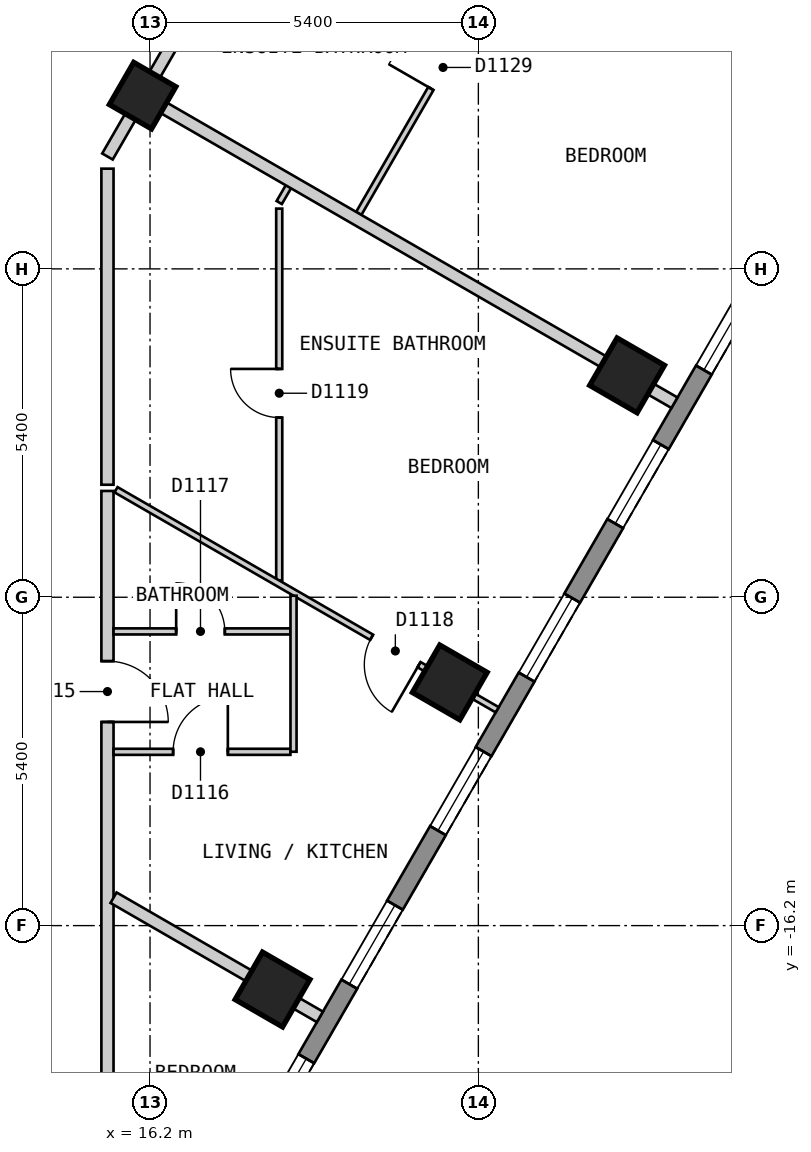
"""IFC4 building model, lengths in metres.
Left out: names, types, materials, properties, quantities, classifications, styles, units other than length and angle.
Written with IfcOpenShell. Run it as: python <this file> out.ifc"""

import sys

from ifc_helpers import new_model, si_unit, direction, frame, frame_2d, origin, origin_2d, place, context, subcontext, project, spatial, polyline, rectangle, outline, extrude, element, fill, save


model = new_model("IFC4")
c1 = context("Model", 3, precision=1e-05, world=origin(), true_north=direction((0.0, 1.0)))
c2 = subcontext(c1, "Body", "Model", "MODEL_VIEW")
j1 = project(units=[si_unit("LENGTHUNIT", "METRE"), si_unit("PLANEANGLEUNIT", "RADIAN")], contexts=[c1])
p1 = place(None, origin())
s1 = spatial("IfcSite", under=j1, at=p1, CompositionType="ELEMENT")
p2 = place(p1, origin())
s2 = spatial("IfcBuilding", under=s1, at=p2, CompositionType="ELEMENT")
p3 = place(p2, frame((0.0, 0.0, 150.6)))
s3 = spatial("IfcBuildingStorey", under=s2, at=p3, CompositionType="ELEMENT", Elevation=150.6)
for number, where, z_axis, x_axis in (
    (1, (18.215, -17.251, 0.0), (0.0, 0.0, 1.0), (0.5, 0.866, 0.0)),
    (2, (21.13, -12.201, 0.0), (0.0, 0.0, 1.0), (0.5, 0.866, 0.0)),
    (3, (24.046, -7.151, 0.0), (0.0, 0.0, 1.0), (0.5, 0.866, 0.0)),
):
    element("IfcColumn", number, at=place(p3, frame(where, z_axis=z_axis, x_axis=x_axis)), inside=s3, PredefinedType="COLUMN", context=c2, shape_type="SweptSolid", body=[
        extrude(rectangle(XDim=0.9, YDim=0.9, at=origin_2d()), origin(), (0.0, 0.0, 1.0), 3.0),
    ])
p4 = place(p3, frame((16.078, -2.551, 0.0), z_axis=(0.0, 0.0, 1.0), x_axis=(0.5, 0.866025403784, 0.0)))
e4 = element("IfcColumn", 4, at=p4, inside=s3, PredefinedType="COLUMN", context=c2, shape_type="SweptSolid", body=[
    extrude(rectangle(XDim=0.8, YDim=0.8, at=origin_2d()), origin(), (0.0, 0.0, 1.0), 3.0),
])
p5 = place(p3, frame((15.862, -23.425, 0.0), z_axis=(0.0, 0.0, 1.0), x_axis=(0.500017503135, 0.866015298109, 0.0)))
e5 = element("IfcWall", 5, at=p5, inside=s3, PredefinedType="SOLIDWALL", context=c2, shape_type="SweptSolid", body=[
    extrude(outline(polyline([(0.0, -0.15), (24.711, -0.15), (24.631, 0.15), (0.08, 0.15), (0.0, -0.15)])), origin(), (0.0, 0.0, 1.0), 2.6),
])
p6 = place(p5, frame((1.4, 0.0, 0.15)))
e6 = element("IfcOpeningElement", 6, at=p6, cuts=e5, PredefinedType="OPENING", context=c2, shape_type="SweptSolid", body=[
    extrude(rectangle(XDim=1.5, YDim=2.1, at=frame_2d((0.75, 1.05))), frame((0.0, 0.16, 0.0), z_axis=(0.0, -1.0, 0.0), x_axis=(1.0, 0.0, 0.0)), (0.0, 0.0, 1.0), 0.32),
])
p7 = place(p5, frame((4.316, 0.0, 0.15)))
e7 = element("IfcOpeningElement", 7, at=p7, cuts=e5, PredefinedType="OPENING", context=c2, shape_type="SweptSolid", body=[
    extrude(rectangle(XDim=1.5, YDim=2.1, at=frame_2d((0.75, 1.05))), frame((0.0, 0.16, 0.0), z_axis=(0.0, -1.0, 0.0), x_axis=(1.0, 0.0, 0.0)), (0.0, 0.0, 1.0), 0.32),
])
p8 = place(p5, frame((7.231, 0.0, 0.15)))
e8 = element("IfcOpeningElement", 8, at=p8, cuts=e5, PredefinedType="OPENING", context=c2, shape_type="SweptSolid", body=[
    extrude(rectangle(XDim=1.5, YDim=2.1, at=frame_2d((0.75, 1.05))), frame((0.0, 0.16, 0.0), z_axis=(0.0, -1.0, 0.0), x_axis=(1.0, 0.0, 0.0)), (0.0, 0.0, 1.0), 0.32),
])
p9 = place(p5, frame((10.147, 0.0, 0.15)))
e9 = element("IfcOpeningElement", 9, at=p9, cuts=e5, PredefinedType="OPENING", context=c2, shape_type="SweptSolid", body=[
    extrude(rectangle(XDim=1.5, YDim=2.1, at=frame_2d((0.75, 1.05))), frame((0.0, 0.16, 0.0), z_axis=(0.0, -1.0, 0.0), x_axis=(1.0, 0.0, 0.0)), (0.0, 0.0, 1.0), 0.32),
])
p10 = place(p5, frame((13.062, 0.0, 0.15)))
e10 = element("IfcOpeningElement", 10, at=p10, cuts=e5, PredefinedType="OPENING", context=c2, shape_type="SweptSolid", body=[
    extrude(rectangle(XDim=1.5, YDim=2.1, at=frame_2d((0.75, 1.05))), frame((0.0, 0.16, 0.0), z_axis=(0.0, -1.0, 0.0), x_axis=(1.0, 0.0, 0.0)), (0.0, 0.0, 1.0), 0.32),
])
p11 = place(p5, frame((15.977, 0.0, 0.15)))
e11 = element("IfcOpeningElement", 11, at=p11, cuts=e5, PredefinedType="OPENING", context=c2, shape_type="SweptSolid", body=[
    extrude(rectangle(XDim=1.5, YDim=2.1, at=frame_2d((0.75, 1.05))), frame((0.0, 0.16, 0.0), z_axis=(0.0, -1.0, 0.0), x_axis=(1.0, 0.0, 0.0)), (0.0, 0.0, 1.0), 0.32),
])
p12 = place(p5, frame((18.893, 0.0, 0.15)))
e12 = element("IfcOpeningElement", 12, at=p12, cuts=e5, PredefinedType="OPENING", context=c2, shape_type="SweptSolid", body=[
    extrude(rectangle(XDim=1.5, YDim=2.1, at=frame_2d((0.75, 1.05))), frame((0.0, 0.16, 0.0), z_axis=(0.0, -1.0, 0.0), x_axis=(1.0, 0.0, 0.0)), (0.0, 0.0, 1.0), 0.32),
])
p13 = place(p5, frame((21.809, 0.0, 0.15)))
e13 = element("IfcOpeningElement", 13, at=p13, cuts=e5, PredefinedType="OPENING", context=c2, shape_type="SweptSolid", body=[
    extrude(rectangle(XDim=1.5, YDim=2.1, at=frame_2d((0.75, 1.05))), frame((0.0, 0.16, 0.0), z_axis=(0.0, -1.0, 0.0), x_axis=(1.0, 0.0, 0.0)), (0.0, 0.0, 1.0), 0.32),
])
p14 = place(p3, frame((15.5, -3.752, 0.0), z_axis=(0.0, 0.0, 1.0), x_axis=(0.0, -1.0, 0.0)))
e14 = element("IfcWall", 14, at=p14, inside=s3, PredefinedType="PARTITIONING", context=c2, shape_type="SweptSolid", body=[
    extrude(rectangle(XDim=5.198, YDim=0.2, at=frame_2d((2.599, 0.0))), origin(), (0.0, 0.0, 1.0), 2.6),
])
p15 = place(p3, frame((13.394, -2.8, 0.0), z_axis=(0.0, 0.0, 1.0), x_axis=(0.499968324138, 0.866043691079, 0.0)))
e15 = element("IfcWall", 15, at=p15, inside=s3, PredefinedType="PARTITIONING", context=c2, shape_type="SweptSolid", body=[
    extrude(rectangle(XDim=3.696, YDim=0.2, at=frame_2d((1.848, 0.0))), origin(), (0.0, 0.0, 1.0), 2.6),
])
p16 = place(p3, frame((15.5, -3.552, 0.0), z_axis=(0.0, 0.0, 1.0), x_axis=(0.499914724673, 0.86607463192, 0.0)))
e16 = element("IfcWall", 16, at=p16, inside=s3, PredefinedType="PARTITIONING", context=c2, shape_type="SweptSolid", body=[
    extrude(rectangle(XDim=4.507, YDim=0.2, at=frame_2d((2.253, 0.0))), origin(), (0.0, 0.0, 1.0), 2.6),
])
p17 = place(p3, frame((15.5, -21.199, 0.0), z_axis=(0.0, 0.0, 1.0), x_axis=(0.0, 1.0, 0.0)))
e17 = element("IfcWall", 17, at=p17, inside=s3, PredefinedType="PARTITIONING", context=c2, shape_type="SweptSolid", body=[
    extrude(rectangle(XDim=12.147, YDim=0.2, at=frame_2d((6.073, 0.0))), origin(), (0.0, 0.0, 1.0), 2.6),
])
p18 = place(p17, frame((8.348, 0.0, 0.0)))
e18 = element("IfcOpeningElement", 18, at=p18, cuts=e17, PredefinedType="OPENING", context=c2, shape_type="SweptSolid", body=[
    extrude(rectangle(XDim=1.0, YDim=2.1, at=frame_2d((0.5, 1.05))), frame((0.0, 0.11, 0.0), z_axis=(0.0, -1.0, 0.0), x_axis=(1.0, 0.0, 0.0)), (0.0, 0.0, 1.0), 0.22),
])
p19 = place(p3, frame((18.325, -4.409, 0.0), z_axis=(0.0, 0.0, 1.0), x_axis=(0.0, -1.0, 0.0)))
e19 = element("IfcWall", 19, at=p19, inside=s3, PredefinedType="PARTITIONING", context=c2, shape_type="SweptSolid", body=[
    extrude(rectangle(XDim=6.115, YDim=0.1, at=frame_2d((3.058, 0.0))), origin(), (0.0, 0.0, 1.0), 2.6),
])
p20 = place(p19, frame((2.636, 0.0, 0.0)))
e20 = element("IfcOpeningElement", 20, at=p20, cuts=e19, PredefinedType="OPENING", context=c2, shape_type="SweptSolid", body=[
    extrude(rectangle(XDim=0.8, YDim=2.1, at=frame_2d((0.4, 1.05))), frame((0.0, 0.06, 0.0), z_axis=(0.0, -1.0, 0.0), x_axis=(1.0, 0.0, 0.0)), (0.0, 0.0, 1.0), 0.12),
])
p21 = place(p3, frame((15.641, -9.032, 0.0), z_axis=(0.0, 0.0, 1.0), x_axis=(0.866049104564, -0.499958946799, 0.0)))
e21 = element("IfcWall", 21, at=p21, inside=s3, PredefinedType="PARTITIONING", context=c2, shape_type="SweptSolid", body=[
    extrude(rectangle(XDim=7.238, YDim=0.1, at=frame_2d((3.619, 0.0))), origin(), (0.0, 0.0, 1.0), 2.6),
])
p22 = place(p21, frame((4.854, 0.0, 0.0)))
e22 = element("IfcOpeningElement", 22, at=p22, cuts=e21, PredefinedType="OPENING", context=c2, shape_type="SweptSolid", body=[
    extrude(rectangle(XDim=0.9, YDim=2.1, at=frame_2d((0.45, 1.05))), frame((0.0, 0.06, 0.0), z_axis=(0.0, -1.0, 0.0), x_axis=(1.0, 0.0, 0.0)), (0.0, 0.0, 1.0), 0.12),
])
p23 = place(p3, frame((22.679, 0.372, 0.0), z_axis=(0.0, 0.0, 1.0), x_axis=(0.865985260119, -0.500069524424, 0.0)))
e23 = element("IfcWall", 23, at=p23, inside=s3, PredefinedType="PARTITIONING", context=c2, shape_type="SweptSolid", body=[
    extrude(rectangle(XDim=5.845, YDim=0.1, at=frame_2d((2.923, 0.0))), origin(), (0.0, 0.0, 1.0), 2.6),
])
p24 = place(p23, frame((2.444, 0.0, 0.0)))
e24 = element("IfcOpeningElement", 24, at=p24, cuts=e23, PredefinedType="OPENING", context=c2, shape_type="SweptSolid", body=[
    extrude(rectangle(XDim=0.9, YDim=2.1, at=frame_2d((0.45, 1.05))), frame((0.0, 0.06, 0.0), z_axis=(0.0, -1.0, 0.0), x_axis=(1.0, 0.0, 0.0)), (0.0, 0.0, 1.0), 0.12),
])
p25 = place(p3, frame((15.6, -11.362, 0.0), z_axis=(0.0, 0.0, 1.0), x_axis=(1.0, 0.0, 0.0)))
e25 = element("IfcWall", 25, at=p25, inside=s3, PredefinedType="PARTITIONING", context=c2, shape_type="SweptSolid", body=[
    extrude(rectangle(XDim=2.91, YDim=0.1, at=frame_2d((1.455, 0.0))), origin(), (0.0, 0.0, 1.0), 2.6),
])
p26 = place(p25, frame((1.03, 0.0, 0.0)))
e26 = element("IfcOpeningElement", 26, at=p26, cuts=e25, PredefinedType="OPENING", context=c2, shape_type="SweptSolid", body=[
    extrude(rectangle(XDim=0.8, YDim=2.1, at=frame_2d((0.4, 1.05))), frame((0.0, 0.06, 0.0), z_axis=(0.0, -1.0, 0.0), x_axis=(1.0, 0.0, 0.0)), (0.0, 0.0, 1.0), 0.12),
])
p27 = place(p3, frame((15.6, -13.342, 0.0), z_axis=(0.0, 0.0, 1.0), x_axis=(1.0, 0.0, 0.0)))
e27 = element("IfcWall", 27, at=p27, inside=s3, PredefinedType="PARTITIONING", context=c2, shape_type="SweptSolid", body=[
    extrude(rectangle(XDim=2.909, YDim=0.1, at=frame_2d((1.455, 0.0))), origin(), (0.0, 0.0, 1.0), 2.6),
])
p28 = place(p27, frame((0.98, 0.0, 0.0)))
e28 = element("IfcOpeningElement", 28, at=p28, cuts=e27, PredefinedType="OPENING", context=c2, shape_type="SweptSolid", body=[
    extrude(rectangle(XDim=0.9, YDim=2.1, at=frame_2d((0.45, 1.05))), frame((0.0, 0.06, 0.0), z_axis=(0.0, -1.0, 0.0), x_axis=(1.0, 0.0, 0.0)), (0.0, 0.0, 1.0), 0.12),
])
p29 = place(p3, frame((18.325, -4.309, 0.0), z_axis=(0.0, 0.0, 1.0), x_axis=(0.5014706583, 0.865174652232, 0.0)))
e29 = element("IfcWall", 29, at=p29, inside=s3, PredefinedType="PARTITIONING", context=c2, shape_type="SweptSolid", body=[
    extrude(rectangle(XDim=0.399, YDim=0.1, at=frame_2d((0.199, 0.0))), origin(), (0.0, 0.0, 1.0), 2.6),
])
p30 = place(p3, frame((19.633, -4.488, 0.0), z_axis=(0.0, 0.0, 1.0), x_axis=(0.500050624552, 0.865996173713, 0.0)))
e30 = element("IfcWall", 30, at=p30, inside=s3, PredefinedType="PARTITIONING", context=c2, shape_type="SweptSolid", body=[
    extrude(rectangle(XDim=5.646, YDim=0.1, at=frame_2d((2.823, 0.0))), origin(), (0.0, 0.0, 1.0), 2.6),
])
p31 = place(p30, frame((2.372, 0.0, 0.0)))
e31 = element("IfcOpeningElement", 31, at=p31, cuts=e30, PredefinedType="OPENING", context=c2, shape_type="SweptSolid", body=[
    extrude(rectangle(XDim=0.8, YDim=2.1, at=frame_2d((0.4, 1.05))), frame((0.0, 0.06, 0.0), z_axis=(0.0, -1.0, 0.0), x_axis=(1.0, 0.0, 0.0)), (0.0, 0.0, 1.0), 0.12),
])
p32 = place(p3, frame((18.56, -13.341, 0.0), z_axis=(0.0, 0.0, 1.0), x_axis=(0.0, 1.0, 0.0)))
e32 = element("IfcWall", 32, at=p32, inside=s3, PredefinedType="PARTITIONING", context=c2, shape_type="SweptSolid", body=[
    extrude(rectangle(XDim=2.566, YDim=0.1, at=frame_2d((1.283, 0.0))), origin(), (0.0, 0.0, 1.0), 2.6),
])
p33 = place(p3, frame((15.6, -15.741, 0.0), z_axis=(0.0, 0.0, 1.0), x_axis=(0.865964599155, -0.500105301922, 0.0)))
e33 = element("IfcWall", 33, at=p33, inside=s3, PredefinedType="PARTITIONING", context=c2, shape_type="SweptSolid", body=[
    extrude(rectangle(XDim=3.919, YDim=0.2, at=frame_2d((1.959, 0.0))), origin(), (0.0, 0.0, 1.0), 2.6),
])
p34 = place(p3, frame((16.165, -2.601, 0.0), z_axis=(0.0, 0.0, 1.0), x_axis=(0.866016855193, -0.500014806302, 0.0)))
e34 = element("IfcWall", 34, at=p34, inside=s3, PredefinedType="PARTITIONING", context=c2, shape_type="SweptSolid", body=[
    extrude(rectangle(XDim=10.0, YDim=0.2, at=frame_2d((5.0, 0.0))), origin(), (0.0, 0.0, 1.0), 2.6),
])
p35 = place(p7, origin())
e35 = element("IfcWindow", 35, at=p35, inside=s3, PartitioningType="SINGLE_PANEL", PredefinedType="WINDOW", context=c2, shape_type="SweptSolid", body=[
    extrude(rectangle(XDim=1.5, YDim=2.1, at=frame_2d((0.75, 1.05))), frame((0.0, 0.03, 0.0), z_axis=(0.0, -1.0, 0.0), x_axis=(1.0, 0.0, 0.0)), (0.0, 0.0, 1.0), 0.06),
])
fill(e7, e35)
p36 = place(p8, origin())
e36 = element("IfcWindow", 36, at=p36, inside=s3, PartitioningType="SINGLE_PANEL", PredefinedType="WINDOW", context=c2, shape_type="SweptSolid", body=[
    extrude(rectangle(XDim=1.5, YDim=2.1, at=frame_2d((0.75, 1.05))), frame((0.0, 0.03, 0.0), z_axis=(0.0, -1.0, 0.0), x_axis=(1.0, 0.0, 0.0)), (0.0, 0.0, 1.0), 0.06),
])
fill(e8, e36)
p37 = place(p9, origin())
e37 = element("IfcWindow", 37, at=p37, inside=s3, PartitioningType="SINGLE_PANEL", PredefinedType="WINDOW", context=c2, shape_type="SweptSolid", body=[
    extrude(rectangle(XDim=1.5, YDim=2.1, at=frame_2d((0.75, 1.05))), frame((0.0, 0.03, 0.0), z_axis=(0.0, -1.0, 0.0), x_axis=(1.0, 0.0, 0.0)), (0.0, 0.0, 1.0), 0.06),
])
fill(e9, e37)
p38 = place(p10, origin())
e38 = element("IfcWindow", 38, at=p38, inside=s3, PartitioningType="SINGLE_PANEL", PredefinedType="WINDOW", context=c2, shape_type="SweptSolid", body=[
    extrude(rectangle(XDim=1.5, YDim=2.1, at=frame_2d((0.75, 1.05))), frame((0.0, 0.03, 0.0), z_axis=(0.0, -1.0, 0.0), x_axis=(1.0, 0.0, 0.0)), (0.0, 0.0, 1.0), 0.06),
])
fill(e10, e38)
p39 = place(p11, origin())
e39 = element("IfcWindow", 39, at=p39, inside=s3, PartitioningType="SINGLE_PANEL", PredefinedType="WINDOW", context=c2, shape_type="SweptSolid", body=[
    extrude(rectangle(XDim=1.5, YDim=2.1, at=frame_2d((0.75, 1.05))), frame((0.0, 0.03, 0.0), z_axis=(0.0, -1.0, 0.0), x_axis=(1.0, 0.0, 0.0)), (0.0, 0.0, 1.0), 0.06),
])
fill(e11, e39)
p40 = place(p12, origin())
e40 = element("IfcWindow", 40, at=p40, inside=s3, PartitioningType="SINGLE_PANEL", PredefinedType="WINDOW", context=c2, shape_type="SweptSolid", body=[
    extrude(rectangle(XDim=1.5, YDim=2.1, at=frame_2d((0.75, 1.05))), frame((0.0, 0.03, 0.0), z_axis=(0.0, -1.0, 0.0), x_axis=(1.0, 0.0, 0.0)), (0.0, 0.0, 1.0), 0.06),
])
fill(e12, e40)
p41 = place(p18, origin())
e41 = element("IfcDoor", 41, at=p41, inside=s3, OperationType="SINGLE_SWING_LEFT", PredefinedType="DOOR", context=c2, shape_type="SweptSolid", body=[
    extrude(rectangle(XDim=1.0, YDim=2.1, at=frame_2d((0.5, 1.05))), frame((0.0, 0.025, 0.0), z_axis=(0.0, -1.0, 0.0), x_axis=(1.0, 0.0, 0.0)), (0.0, 0.0, 1.0), 0.05),
])
fill(e18, e41)
p42 = place(p28, origin())
e42 = element("IfcDoor", 42, at=p42, inside=s3, OperationType="SINGLE_SWING_RIGHT", PredefinedType="DOOR", context=c2, shape_type="SweptSolid", body=[
    extrude(rectangle(XDim=0.9, YDim=2.1, at=frame_2d((0.45, 1.05))), frame((0.0, 0.025, 0.0), z_axis=(0.0, -1.0, 0.0), x_axis=(1.0, 0.0, 0.0)), (0.0, 0.0, 1.0), 0.05),
])
fill(e28, e42)
p43 = place(p26, origin())
e43 = element("IfcDoor", 43, at=p43, inside=s3, OperationType="SINGLE_SWING_LEFT", PredefinedType="DOOR", context=c2, shape_type="SweptSolid", body=[
    extrude(rectangle(XDim=0.8, YDim=2.1, at=frame_2d((0.4, 1.05))), frame((0.0, 0.025, 0.0), z_axis=(0.0, -1.0, 0.0), x_axis=(1.0, 0.0, 0.0)), (0.0, 0.0, 1.0), 0.05),
])
fill(e26, e43)
p44 = place(p22, origin())
e44 = element("IfcDoor", 44, at=p44, inside=s3, OperationType="SINGLE_SWING_RIGHT", PredefinedType="DOOR", context=c2, shape_type="SweptSolid", body=[
    extrude(rectangle(XDim=0.9, YDim=2.1, at=frame_2d((0.45, 1.05))), frame((0.0, 0.025, 0.0), z_axis=(0.0, -1.0, 0.0), x_axis=(1.0, 0.0, 0.0)), (0.0, 0.0, 1.0), 0.05),
])
fill(e22, e44)
p45 = place(p20, origin())
e45 = element("IfcDoor", 45, at=p45, inside=s3, OperationType="SINGLE_SWING_LEFT", PredefinedType="DOOR", context=c2, shape_type="SweptSolid", body=[
    extrude(rectangle(XDim=0.8, YDim=2.1, at=frame_2d((0.4, 1.05))), frame((0.0, 0.025, 0.0), z_axis=(0.0, -1.0, 0.0), x_axis=(1.0, 0.0, 0.0)), (0.0, 0.0, 1.0), 0.05),
])
fill(e20, e45)
p46 = place(p31, origin())
e46 = element("IfcDoor", 46, at=p46, inside=s3, OperationType="SINGLE_SWING_LEFT", PredefinedType="DOOR", context=c2, shape_type="SweptSolid", body=[
    extrude(rectangle(XDim=0.8, YDim=2.1, at=frame_2d((0.4, 1.05))), frame((0.0, 0.025, 0.0), z_axis=(0.0, -1.0, 0.0), x_axis=(1.0, 0.0, 0.0)), (0.0, 0.0, 1.0), 0.05),
])
fill(e31, e46)
save(model, sys.argv[1])
